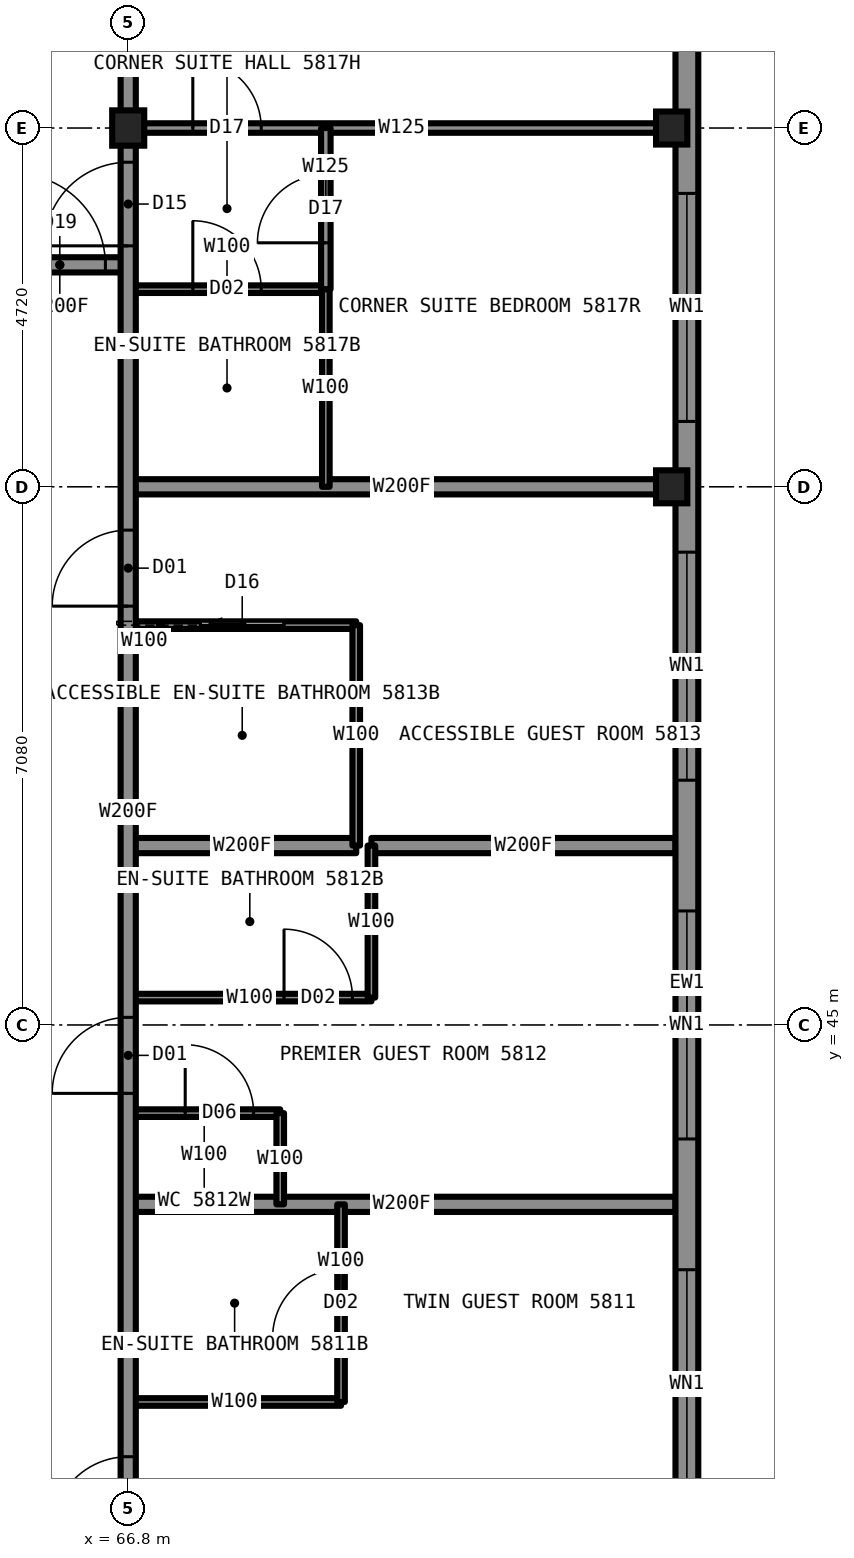
"""IFC4 building model, lengths in metres.
Left out: names, types, materials, properties, quantities, classifications, styles, units other than length and angle.
Written with IfcOpenShell. Run it as: python <this file> out.ifc"""

import sys

from ifc_helpers import new_model, si_unit, direction, frame, frame_2d, origin, origin_2d, place, context, subcontext, project, spatial, rectangle, i_section, extrude, element, fill, save


model = new_model("IFC4")
c1 = context("Model", 3, precision=1e-05, world=origin(), true_north=direction((0.0, 1.0)))
c2 = subcontext(c1, "Body", "Model", "MODEL_VIEW")
j1 = project(units=[si_unit("LENGTHUNIT", "METRE"), si_unit("PLANEANGLEUNIT", "RADIAN")], contexts=[c1])
p1 = place(None, origin())
s1 = spatial("IfcSite", under=j1, at=p1, CompositionType="ELEMENT")
p2 = place(p1, origin())
s2 = spatial("IfcBuilding", under=s1, at=p2, CompositionType="ELEMENT")
p3 = place(p2, frame((0.0, 0.0, 214.3)))
s3 = spatial("IfcBuildingStorey", under=s2, at=p3, CompositionType="ELEMENT", Elevation=214.3)
for number, where, z_axis, x_axis in (
    (1, (73.95, 52.08, 0.0), (0.0, 0.0, 1.0), (1.0, 0.0, 0.0)),
    (2, (73.95, 56.8, 0.0), (0.0, 0.0, 1.0), (1.0, 0.0, 0.0)),
):
    element("IfcColumn", number, at=place(p3, frame(where, z_axis=z_axis, x_axis=x_axis)), inside=s3, PredefinedType="COLUMN", context=c2, shape_type="SweptSolid", body=[
        extrude(i_section(OverallWidth=0.411, OverallDepth=0.434, WebThickness=0.036, FlangeThickness=0.057, at=origin_2d()), origin(), (0.0, 0.0, 1.0), 3.5),
    ])
p4 = place(p3, frame((66.8, 56.8, 0.0), z_axis=(0.0, 0.0, 1.0), x_axis=(1.0, 0.0, 0.0)))
e3 = element("IfcColumn", 3, at=p4, inside=s3, PredefinedType="COLUMN", context=c2, shape_type="SweptSolid", body=[
    extrude(i_section(OverallWidth=0.422, OverallDepth=0.465, WebThickness=0.045, FlangeThickness=0.073, at=origin_2d()), origin(), (0.0, 0.0, 1.0), 3.5),
])
p5 = place(p3, frame((66.8, 43.84, 0.0), z_axis=(0.0, 0.0, 1.0), x_axis=(1.0, 0.0, 0.0)))
e4 = element("IfcWall", 4, at=p5, inside=s3, PredefinedType="PARTITIONING", context=c2, shape_type="SweptSolid", body=[
    extrude(rectangle(XDim=2.0, YDim=0.1, at=frame_2d((1.0, 0.0))), origin(), (0.0, 0.0, 1.0), 3.33),
])
p6 = place(p5, frame((0.75, 0.0, 0.0)))
e5 = element("IfcOpeningElement", 5, at=p6, cuts=e4, PredefinedType="OPENING", context=c2, shape_type="SweptSolid", body=[
    extrude(rectangle(XDim=0.9, YDim=2.1, at=frame_2d((0.45, 1.05))), frame((0.0, 0.06, 0.0), z_axis=(0.0, -1.0, 0.0), x_axis=(1.0, 0.0, 0.0)), (0.0, 0.0, 1.0), 0.12),
])
p7 = place(p3, frame((66.8, 42.64, 0.0), z_axis=(0.0, 0.0, 1.0), x_axis=(1.0, 0.0, 0.0)))
e6 = element("IfcWall", 6, at=p7, inside=s3, PredefinedType="PARTITIONING", context=c2, shape_type="SweptSolid", body=[
    extrude(rectangle(XDim=7.2, YDim=0.2, at=frame_2d((3.6, 0.0))), origin(), (0.0, 0.0, 1.0), 2.73),
])
p8 = place(p3, frame((66.8, 40.04, 0.0), z_axis=(0.0, 0.0, 1.0), x_axis=(1.0, 0.0, 0.0)))
e7 = element("IfcWall", 7, at=p8, inside=s3, PredefinedType="PARTITIONING", context=c2, shape_type="SweptSolid", body=[
    extrude(rectangle(XDim=2.8, YDim=0.1, at=frame_2d((1.4, 0.0))), origin(), (0.0, 0.0, 1.0), 3.33),
])
p9 = place(p3, frame((66.8, 45.36, 0.0), z_axis=(0.0, 0.0, 1.0), x_axis=(1.0, 0.0, 0.0)))
e8 = element("IfcWall", 8, at=p9, inside=s3, PredefinedType="PARTITIONING", context=c2, shape_type="SweptSolid", body=[
    extrude(rectangle(XDim=3.2, YDim=0.1, at=frame_2d((1.6, 0.0))), origin(), (0.0, 0.0, 1.0), 3.33),
])
p10 = place(p9, frame((2.05, 0.0, 0.0)))
e9 = element("IfcOpeningElement", 9, at=p10, cuts=e8, PredefinedType="OPENING", context=c2, shape_type="SweptSolid", body=[
    extrude(rectangle(XDim=0.9, YDim=2.1, at=frame_2d((0.45, 1.05))), frame((0.0, 0.06, 0.0), z_axis=(0.0, -1.0, 0.0), x_axis=(1.0, 0.0, 0.0)), (0.0, 0.0, 1.0), 0.12),
])
p11 = place(p3, frame((65.0, 55.0, 0.0), z_axis=(0.0, 0.0, 1.0), x_axis=(1.0, 0.0, 0.0)))
e10 = element("IfcWall", 10, at=p11, inside=s3, PredefinedType="PARTITIONING", context=c2, shape_type="SweptSolid", body=[
    extrude(rectangle(XDim=1.8, YDim=0.2, at=frame_2d((0.9, 0.0))), origin(), (0.0, 0.0, 1.0), 3.33),
])
p12 = place(p11, frame((0.3, 0.0, 0.0)))
e11 = element("IfcOpeningElement", 11, at=p12, cuts=e10, PredefinedType="OPENING", context=c2, shape_type="SweptSolid", body=[
    extrude(rectangle(XDim=1.2, YDim=2.2, at=frame_2d((0.6, 1.1))), frame((0.0, 0.11, 0.0), z_axis=(0.0, -1.0, 0.0), x_axis=(1.0, 0.0, 0.0)), (0.0, 0.0, 1.0), 0.22),
])
p13 = place(p3, frame((66.8, 56.8, 0.0), z_axis=(0.0, 0.0, 1.0), x_axis=(1.0, 0.0, 0.0)))
e12 = element("IfcWall", 12, at=p13, inside=s3, PredefinedType="PARTITIONING", context=c2, shape_type="SweptSolid", body=[
    extrude(rectangle(XDim=7.2, YDim=0.125, at=frame_2d((3.6, 0.0))), origin(), (0.0, 0.0, 1.0), 2.573),
])
p14 = place(p13, frame((0.85, 0.0, 0.0)))
e13 = element("IfcOpeningElement", 13, at=p14, cuts=e12, PredefinedType="OPENING", context=c2, shape_type="SweptSolid", body=[
    extrude(rectangle(XDim=0.9, YDim=2.2, at=frame_2d((0.45, 1.1))), frame((0.0, 0.073, 0.0), z_axis=(0.0, -1.0, 0.0), x_axis=(1.0, 0.0, 0.0)), (0.0, 0.0, 1.0), 0.145),
])
p15 = place(p3, frame((66.8, 47.36, 0.0), z_axis=(0.0, 0.0, 1.0), x_axis=(1.0, 0.0, 0.0)))
e14 = element("IfcWall", 14, at=p15, inside=s3, PredefinedType="PARTITIONING", context=c2, shape_type="SweptSolid", body=[
    extrude(rectangle(XDim=3.0, YDim=0.2, at=frame_2d((1.5, 0.0))), origin(), (0.0, 0.0, 1.0), 2.73),
])
p16 = place(p3, frame((70.0, 47.36, 0.0), z_axis=(0.0, 0.0, 1.0), x_axis=(1.0, 0.0, 0.0)))
e15 = element("IfcWall", 15, at=p16, inside=s3, PredefinedType="PARTITIONING", context=c2, shape_type="SweptSolid", body=[
    extrude(rectangle(XDim=4.0, YDim=0.2, at=frame_2d((2.0, 0.0))), origin(), (0.0, 0.0, 1.0), 2.73),
])
p17 = place(p3, frame((66.8, 50.26, 0.0), z_axis=(0.0, 0.0, 1.0), x_axis=(1.0, 0.0, 0.0)))
e16 = element("IfcWall", 16, at=p17, inside=s3, PredefinedType="PARTITIONING", context=c2, shape_type="SweptSolid", body=[
    extrude(rectangle(XDim=3.0, YDim=0.1, at=frame_2d((1.5, 0.0))), origin(), (0.0, 0.0, 1.0), 3.33),
])
p18 = place(p17, frame((0.95, 0.0, 0.0)))
e17 = element("IfcOpeningElement", 17, at=p18, cuts=e16, PredefinedType="OPENING", context=c2, shape_type="SweptSolid", body=[
    extrude(rectangle(XDim=1.1, YDim=2.1, at=frame_2d((0.55, 1.05))), frame((0.0, 0.06, 0.0), z_axis=(0.0, -1.0, 0.0), x_axis=(1.0, 0.0, 0.0)), (0.0, 0.0, 1.0), 0.12),
])
p19 = place(p3, frame((66.8, 52.08, 0.0), z_axis=(0.0, 0.0, 1.0), x_axis=(1.0, 0.0, 0.0)))
e18 = element("IfcWall", 18, at=p19, inside=s3, PredefinedType="PARTITIONING", context=c2, shape_type="SweptSolid", body=[
    extrude(rectangle(XDim=7.2, YDim=0.2, at=frame_2d((3.6, 0.0))), origin(), (0.0, 0.0, 1.0), 2.573),
])
p20 = place(p3, frame((66.8, 54.68, 0.0), z_axis=(0.0, 0.0, 1.0), x_axis=(1.0, 0.0, 0.0)))
e19 = element("IfcWall", 19, at=p20, inside=s3, PredefinedType="PARTITIONING", context=c2, shape_type="SweptSolid", body=[
    extrude(rectangle(XDim=2.6, YDim=0.1, at=frame_2d((1.3, 0.0))), origin(), (0.0, 0.0, 1.0), 3.33),
])
p21 = place(p20, frame((0.85, 0.0, 0.0)))
e20 = element("IfcOpeningElement", 20, at=p21, cuts=e19, PredefinedType="OPENING", context=c2, shape_type="SweptSolid", body=[
    extrude(rectangle(XDim=0.9, YDim=2.1, at=frame_2d((0.45, 1.05))), frame((0.0, 0.06, 0.0), z_axis=(0.0, -1.0, 0.0), x_axis=(1.0, 0.0, 0.0)), (0.0, 0.0, 1.0), 0.12),
])
p22 = place(p3, frame((66.8, 33.2, 0.0), z_axis=(0.0, 0.0, 1.0), x_axis=(0.0, 1.0, 0.0)))
e21 = element("IfcWall", 21, at=p22, inside=s3, PredefinedType="PARTITIONING", context=c2, shape_type="SweptSolid", body=[
    extrude(rectangle(XDim=23.58, YDim=0.2, at=frame_2d((11.79, 0.0))), origin(), (0.0, 0.0, 1.0), 3.33),
])
p23 = place(p22, frame((5.12, 0.0, 0.0)))
e22 = element("IfcOpeningElement", 22, at=p23, cuts=e21, PredefinedType="OPENING", context=c2, shape_type="SweptSolid", body=[
    extrude(rectangle(XDim=1.0, YDim=2.2, at=frame_2d((0.5, 1.1))), frame((0.0, 0.11, 0.0), z_axis=(0.0, -1.0, 0.0), x_axis=(1.0, 0.0, 0.0)), (0.0, 0.0, 1.0), 0.22),
])
p24 = place(p22, frame((10.9, 0.0, 0.0)))
e23 = element("IfcOpeningElement", 23, at=p24, cuts=e21, PredefinedType="OPENING", context=c2, shape_type="SweptSolid", body=[
    extrude(rectangle(XDim=1.0, YDim=2.2, at=frame_2d((0.5, 1.1))), frame((0.0, 0.11, 0.0), z_axis=(0.0, -1.0, 0.0), x_axis=(1.0, 0.0, 0.0)), (0.0, 0.0, 1.0), 0.22),
])
p25 = place(p22, frame((17.31, 0.0, 0.0)))
e24 = element("IfcOpeningElement", 24, at=p25, cuts=e21, PredefinedType="OPENING", context=c2, shape_type="SweptSolid", body=[
    extrude(rectangle(XDim=1.0, YDim=2.2, at=frame_2d((0.5, 1.1))), frame((0.0, 0.11, 0.0), z_axis=(0.0, -1.0, 0.0), x_axis=(1.0, 0.0, 0.0)), (0.0, 0.0, 1.0), 0.22),
])
p26 = place(p22, frame((22.05, 0.0, 0.0)))
e25 = element("IfcOpeningElement", 25, at=p26, cuts=e21, PredefinedType="OPENING", context=c2, shape_type="SweptSolid", body=[
    extrude(rectangle(XDim=1.1, YDim=2.2, at=frame_2d((0.55, 1.1))), frame((0.0, 0.11, 0.0), z_axis=(0.0, -1.0, 0.0), x_axis=(1.0, 0.0, 0.0)), (0.0, 0.0, 1.0), 0.22),
])
p27 = place(p22, frame((0.65, 0.0, 0.0)))
e26 = element("IfcOpeningElement", 26, at=p27, cuts=e21, PredefinedType="OPENING", context=c2, shape_type="SweptSolid", body=[
    extrude(rectangle(XDim=1.1, YDim=2.2, at=frame_2d((0.55, 1.1))), frame((0.0, 0.11, 0.0), z_axis=(0.0, -1.0, 0.0), x_axis=(1.0, 0.0, 0.0)), (0.0, 0.0, 1.0), 0.22),
])
p28 = place(p3, frame((68.8, 42.64, 0.0), z_axis=(0.0, 0.0, 1.0), x_axis=(0.0, 1.0, 0.0)))
e27 = element("IfcWall", 27, at=p28, inside=s3, PredefinedType="PARTITIONING", context=c2, shape_type="SweptSolid", body=[
    extrude(rectangle(XDim=1.2, YDim=0.1, at=frame_2d((0.6, 0.0))), origin(), (0.0, 0.0, 1.0), 3.33),
])
p29 = place(p3, frame((69.4, 52.08, 0.0), z_axis=(0.0, 0.0, 1.0), x_axis=(0.0, 1.0, 0.0)))
e28 = element("IfcWall", 28, at=p29, inside=s3, PredefinedType="PARTITIONING", context=c2, shape_type="SweptSolid", body=[
    extrude(rectangle(XDim=2.6, YDim=0.1, at=frame_2d((1.3, 0.0))), origin(), (0.0, 0.0, 1.0), 3.33),
])
p30 = place(p3, frame((69.4, 54.68, 0.0), z_axis=(0.0, 0.0, 1.0), x_axis=(0.0, 1.0, 0.0)))
e29 = element("IfcWall", 29, at=p30, inside=s3, PredefinedType="PARTITIONING", context=c2, shape_type="SweptSolid", body=[
    extrude(rectangle(XDim=2.12, YDim=0.125, at=frame_2d((1.06, 0.0))), origin(), (0.0, 0.0, 1.0), 3.33),
])
p31 = place(p30, frame((0.61, 0.0, 0.0)))
e30 = element("IfcOpeningElement", 30, at=p31, cuts=e29, PredefinedType="OPENING", context=c2, shape_type="SweptSolid", body=[
    extrude(rectangle(XDim=0.9, YDim=2.2, at=frame_2d((0.45, 1.1))), frame((0.0, 0.073, 0.0), z_axis=(0.0, -1.0, 0.0), x_axis=(1.0, 0.0, 0.0)), (0.0, 0.0, 1.0), 0.145),
])
p32 = place(p3, frame((69.6, 40.04, 0.0), z_axis=(0.0, 0.0, 1.0), x_axis=(0.0, 1.0, 0.0)))
e31 = element("IfcWall", 31, at=p32, inside=s3, PredefinedType="PARTITIONING", context=c2, shape_type="SweptSolid", body=[
    extrude(rectangle(XDim=2.6, YDim=0.1, at=frame_2d((1.3, 0.0))), origin(), (0.0, 0.0, 1.0), 3.33),
])
p33 = place(p32, frame((0.85, 0.0, 0.0)))
e32 = element("IfcOpeningElement", 32, at=p33, cuts=e31, PredefinedType="OPENING", context=c2, shape_type="SweptSolid", body=[
    extrude(rectangle(XDim=0.9, YDim=2.1, at=frame_2d((0.45, 1.05))), frame((0.0, 0.06, 0.0), z_axis=(0.0, -1.0, 0.0), x_axis=(1.0, 0.0, 0.0)), (0.0, 0.0, 1.0), 0.12),
])
p34 = place(p3, frame((69.8, 47.36, 0.0), z_axis=(0.0, 0.0, 1.0), x_axis=(0.0, 1.0, 0.0)))
e33 = element("IfcWall", 33, at=p34, inside=s3, PredefinedType="PARTITIONING", context=c2, shape_type="SweptSolid", body=[
    extrude(rectangle(XDim=2.9, YDim=0.1, at=frame_2d((1.45, 0.0))), origin(), (0.0, 0.0, 1.0), 3.33),
])
p35 = place(p3, frame((70.0, 45.36, 0.0), z_axis=(0.0, 0.0, 1.0), x_axis=(0.0, 1.0, 0.0)))
e34 = element("IfcWall", 34, at=p35, inside=s3, PredefinedType="PARTITIONING", context=c2, shape_type="SweptSolid", body=[
    extrude(rectangle(XDim=2.0, YDim=0.1, at=frame_2d((1.0, 0.0))), origin(), (0.0, 0.0, 1.0), 3.33),
])
p36 = place(p3, frame((74.15, 31.2, 0.0), z_axis=(0.0, 0.0, 1.0), x_axis=(0.0, 1.0, 0.0)))
e35 = element("IfcWall", 35, at=p36, inside=s3, PredefinedType="SOLIDWALL", context=c2, shape_type="SweptSolid", body=[
    extrude(rectangle(XDim=27.6, YDim=0.3, at=frame_2d((13.8, 0.0))), origin(), (0.0, 0.0, 1.0), 2.63),
])
p37 = place(p36, frame((2.86, 0.0, 0.3)))
e36 = element("IfcOpeningElement", 36, at=p37, cuts=e35, PredefinedType="OPENING", context=c2, shape_type="SweptSolid", body=[
    extrude(rectangle(XDim=3.0, YDim=2.0, at=frame_2d((1.5, 1.0))), frame((0.0, 0.16, 0.0), z_axis=(0.0, -1.0, 0.0), x_axis=(1.0, 0.0, 0.0)), (0.0, 0.0, 1.0), 0.32),
])
p38 = place(p36, frame((7.58, 0.0, 0.3)))
e37 = element("IfcOpeningElement", 37, at=p38, cuts=e35, PredefinedType="OPENING", context=c2, shape_type="SweptSolid", body=[
    extrude(rectangle(XDim=3.0, YDim=2.0, at=frame_2d((1.5, 1.0))), frame((0.0, 0.16, 0.0), z_axis=(0.0, -1.0, 0.0), x_axis=(1.0, 0.0, 0.0)), (0.0, 0.0, 1.0), 0.32),
])
p39 = place(p36, frame((12.3, 0.0, 0.3)))
e38 = element("IfcOpeningElement", 38, at=p39, cuts=e35, PredefinedType="OPENING", context=c2, shape_type="SweptSolid", body=[
    extrude(rectangle(XDim=3.0, YDim=2.0, at=frame_2d((1.5, 1.0))), frame((0.0, 0.16, 0.0), z_axis=(0.0, -1.0, 0.0), x_axis=(1.0, 0.0, 0.0)), (0.0, 0.0, 1.0), 0.32),
])
p40 = place(p36, frame((17.02, 0.0, 0.3)))
e39 = element("IfcOpeningElement", 39, at=p40, cuts=e35, PredefinedType="OPENING", context=c2, shape_type="SweptSolid", body=[
    extrude(rectangle(XDim=3.0, YDim=2.0, at=frame_2d((1.5, 1.0))), frame((0.0, 0.16, 0.0), z_axis=(0.0, -1.0, 0.0), x_axis=(1.0, 0.0, 0.0)), (0.0, 0.0, 1.0), 0.32),
])
p41 = place(p36, frame((21.74, 0.0, 0.3)))
e40 = element("IfcOpeningElement", 40, at=p41, cuts=e35, PredefinedType="OPENING", context=c2, shape_type="SweptSolid", body=[
    extrude(rectangle(XDim=3.0, YDim=2.0, at=frame_2d((1.5, 1.0))), frame((0.0, 0.16, 0.0), z_axis=(0.0, -1.0, 0.0), x_axis=(1.0, 0.0, 0.0)), (0.0, 0.0, 1.0), 0.32),
])
p42 = place(p3, frame((66.8, 56.78, 0.0), z_axis=(0.0, 0.0, 1.0), x_axis=(0.0, 1.0, 0.0)))
e41 = element("IfcWall", 41, at=p42, inside=s3, PredefinedType="PARTITIONING", context=c2, shape_type="SweptSolid", body=[
    extrude(rectangle(XDim=2.82, YDim=0.2, at=frame_2d((1.41, 0.0))), origin(), (0.0, 0.0, 1.0), 2.573),
])
p43 = place(p12, origin())
e42 = element("IfcDoor", 42, at=p43, inside=s3, OperationType="SINGLE_SWING_LEFT", PredefinedType="DOOR", context=c2, shape_type="SweptSolid", body=[
    extrude(rectangle(XDim=1.2, YDim=2.2, at=frame_2d((0.6, 1.1))), frame((0.0, 0.025, 0.0), z_axis=(0.0, -1.0, 0.0), x_axis=(1.0, 0.0, 0.0)), (0.0, 0.0, 1.0), 0.05),
])
fill(e11, e42)
p44 = place(p23, origin())
e43 = element("IfcDoor", 43, at=p44, inside=s3, OperationType="SINGLE_SWING_LEFT", PredefinedType="DOOR", context=c2, shape_type="SweptSolid", body=[
    extrude(rectangle(XDim=1.0, YDim=2.2, at=frame_2d((0.5, 1.1))), frame((0.0, 0.025, 0.0), z_axis=(0.0, -1.0, 0.0), x_axis=(1.0, 0.0, 0.0)), (0.0, 0.0, 1.0), 0.05),
])
fill(e22, e43)
p45 = place(p33, origin())
e44 = element("IfcDoor", 44, at=p45, inside=s3, OperationType="SINGLE_SWING_RIGHT", PredefinedType="DOOR", context=c2, shape_type="SweptSolid", body=[
    extrude(rectangle(XDim=0.9, YDim=2.1, at=frame_2d((0.45, 1.05))), frame((0.0, 0.025, 0.0), z_axis=(0.0, -1.0, 0.0), x_axis=(1.0, 0.0, 0.0)), (0.0, 0.0, 1.0), 0.05),
])
fill(e32, e44)
p46 = place(p24, origin())
e45 = element("IfcDoor", 45, at=p46, inside=s3, OperationType="SINGLE_SWING_LEFT", PredefinedType="DOOR", context=c2, shape_type="SweptSolid", body=[
    extrude(rectangle(XDim=1.0, YDim=2.2, at=frame_2d((0.5, 1.1))), frame((0.0, 0.025, 0.0), z_axis=(0.0, -1.0, 0.0), x_axis=(1.0, 0.0, 0.0)), (0.0, 0.0, 1.0), 0.05),
])
fill(e23, e45)
p47 = place(p10, origin())
e46 = element("IfcDoor", 46, at=p47, inside=s3, OperationType="SINGLE_SWING_RIGHT", PredefinedType="DOOR", context=c2, shape_type="SweptSolid", body=[
    extrude(rectangle(XDim=0.9, YDim=2.1, at=frame_2d((0.45, 1.05))), frame((0.0, 0.025, 0.0), z_axis=(0.0, -1.0, 0.0), x_axis=(1.0, 0.0, 0.0)), (0.0, 0.0, 1.0), 0.05),
])
fill(e9, e46)
p48 = place(p6, origin())
e47 = element("IfcDoor", 47, at=p48, inside=s3, OperationType="SINGLE_SWING_LEFT", PredefinedType="DOOR", context=c2, shape_type="SweptSolid", body=[
    extrude(rectangle(XDim=0.9, YDim=2.1, at=frame_2d((0.45, 1.05))), frame((0.0, 0.025, 0.0), z_axis=(0.0, -1.0, 0.0), x_axis=(1.0, 0.0, 0.0)), (0.0, 0.0, 1.0), 0.05),
])
fill(e5, e47)
p49 = place(p25, origin())
e48 = element("IfcDoor", 48, at=p49, inside=s3, OperationType="SINGLE_SWING_LEFT", PredefinedType="DOOR", context=c2, shape_type="SweptSolid", body=[
    extrude(rectangle(XDim=1.0, YDim=2.2, at=frame_2d((0.5, 1.1))), frame((0.0, 0.025, 0.0), z_axis=(0.0, -1.0, 0.0), x_axis=(1.0, 0.0, 0.0)), (0.0, 0.0, 1.0), 0.05),
])
fill(e24, e48)
p50 = place(p18, origin())
e49 = element("IfcDoor", 49, at=p50, inside=s3, OperationType="SLIDING_TO_LEFT", PredefinedType="DOOR", context=c2, shape_type="SweptSolid", body=[
    extrude(rectangle(XDim=1.1, YDim=2.1, at=frame_2d((0.55, 1.05))), frame((0.0, 0.025, 0.0), z_axis=(0.0, -1.0, 0.0), x_axis=(1.0, 0.0, 0.0)), (0.0, 0.0, 1.0), 0.05),
])
fill(e17, e49)
p51 = place(p14, origin())
e50 = element("IfcDoor", 50, at=p51, inside=s3, OperationType="SINGLE_SWING_LEFT", PredefinedType="DOOR", context=c2, shape_type="SweptSolid", body=[
    extrude(rectangle(XDim=0.9, YDim=2.2, at=frame_2d((0.45, 1.1))), frame((0.0, 0.025, 0.0), z_axis=(0.0, -1.0, 0.0), x_axis=(1.0, 0.0, 0.0)), (0.0, 0.0, 1.0), 0.05),
])
fill(e13, e50)
p52 = place(p21, origin())
e51 = element("IfcDoor", 51, at=p52, inside=s3, OperationType="SINGLE_SWING_RIGHT", PredefinedType="DOOR", context=c2, shape_type="SweptSolid", body=[
    extrude(rectangle(XDim=0.9, YDim=2.1, at=frame_2d((0.45, 1.05))), frame((0.0, 0.025, 0.0), z_axis=(0.0, -1.0, 0.0), x_axis=(1.0, 0.0, 0.0)), (0.0, 0.0, 1.0), 0.05),
])
fill(e20, e51)
p53 = place(p26, origin())
e52 = element("IfcDoor", 52, at=p53, inside=s3, OperationType="SINGLE_SWING_LEFT", PredefinedType="DOOR", context=c2, shape_type="SweptSolid", body=[
    extrude(rectangle(XDim=1.1, YDim=2.2, at=frame_2d((0.55, 1.1))), frame((0.0, 0.025, 0.0), z_axis=(0.0, -1.0, 0.0), x_axis=(1.0, 0.0, 0.0)), (0.0, 0.0, 1.0), 0.05),
])
fill(e25, e52)
p54 = place(p31, origin())
e53 = element("IfcDoor", 53, at=p54, inside=s3, OperationType="SINGLE_SWING_LEFT", PredefinedType="DOOR", context=c2, shape_type="SweptSolid", body=[
    extrude(rectangle(XDim=0.9, YDim=2.2, at=frame_2d((0.45, 1.1))), frame((0.0, 0.025, 0.0), z_axis=(0.0, -1.0, 0.0), x_axis=(1.0, 0.0, 0.0)), (0.0, 0.0, 1.0), 0.05),
])
fill(e30, e53)
p55 = place(p38, origin())
e54 = element("IfcWindow", 54, at=p55, inside=s3, PartitioningType="SINGLE_PANEL", PredefinedType="WINDOW", context=c2, shape_type="SweptSolid", body=[
    extrude(rectangle(XDim=3.0, YDim=2.0, at=frame_2d((1.5, 1.0))), frame((0.0, 0.13, 0.0), z_axis=(0.0, -1.0, 0.0), x_axis=(1.0, 0.0, 0.0)), (0.0, 0.0, 1.0), 0.06),
])
fill(e37, e54)
p56 = place(p39, origin())
e55 = element("IfcWindow", 55, at=p56, inside=s3, PartitioningType="SINGLE_PANEL", PredefinedType="WINDOW", context=c2, shape_type="SweptSolid", body=[
    extrude(rectangle(XDim=3.0, YDim=2.0, at=frame_2d((1.5, 1.0))), frame((0.0, 0.13, 0.0), z_axis=(0.0, -1.0, 0.0), x_axis=(1.0, 0.0, 0.0)), (0.0, 0.0, 1.0), 0.06),
])
fill(e38, e55)
p57 = place(p40, origin())
e56 = element("IfcWindow", 56, at=p57, inside=s3, PartitioningType="SINGLE_PANEL", PredefinedType="WINDOW", context=c2, shape_type="SweptSolid", body=[
    extrude(rectangle(XDim=3.0, YDim=2.0, at=frame_2d((1.5, 1.0))), frame((0.0, 0.13, 0.0), z_axis=(0.0, -1.0, 0.0), x_axis=(1.0, 0.0, 0.0)), (0.0, 0.0, 1.0), 0.06),
])
fill(e39, e56)
p58 = place(p41, origin())
e57 = element("IfcWindow", 57, at=p58, inside=s3, PartitioningType="SINGLE_PANEL", PredefinedType="WINDOW", context=c2, shape_type="SweptSolid", body=[
    extrude(rectangle(XDim=3.0, YDim=2.0, at=frame_2d((1.5, 1.0))), frame((0.0, 0.13, 0.0), z_axis=(0.0, -1.0, 0.0), x_axis=(1.0, 0.0, 0.0)), (0.0, 0.0, 1.0), 0.06),
])
fill(e40, e57)
save(model, sys.argv[1])
